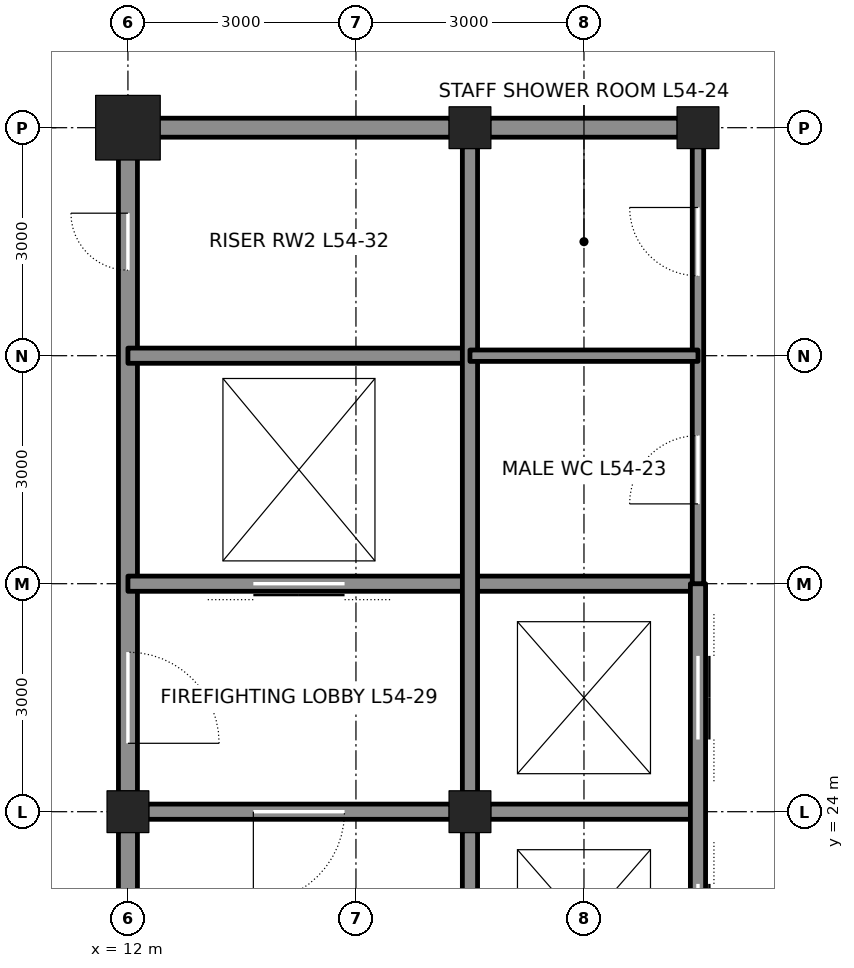
"""IFC4 building model, lengths in metres.
Left out: names, types, materials, properties, quantities, classifications, styles, units other than length and angle.
Written with IfcOpenShell. Run it as: python <this file> out.ifc"""

import sys

from ifc_helpers import new_model, si_unit, direction, frame, frame_2d, origin, origin_2d, place, context, subcontext, project, spatial, rectangle, hollow_rectangle, extrude, element, fill, save


model = new_model("IFC4")
c1 = context("Model", 3, precision=1e-05, world=origin(), true_north=direction((0.0, 1.0)))
c2 = subcontext(c1, "Body", "Model", "MODEL_VIEW")
j1 = project(units=[si_unit("LENGTHUNIT", "METRE"), si_unit("PLANEANGLEUNIT", "RADIAN")], contexts=[c1])
p1 = place(None, origin())
s1 = spatial("IfcSite", under=j1, at=p1, CompositionType="ELEMENT")
p2 = place(p1, origin())
s2 = spatial("IfcBuilding", under=s1, at=p2, CompositionType="ELEMENT")
p3 = place(p2, frame((0.0, 0.0, 243.3)))
s3 = spatial("IfcBuildingStorey", under=s2, at=p3, CompositionType="ELEMENT", Elevation=243.3)
p4 = place(p3, frame((12.0, 33.0, 0.0), z_axis=(0.0, 0.0, 1.0), x_axis=(1.0, 0.0, 0.0)))
e1 = element("IfcColumn", 1, at=p4, inside=s3, PredefinedType="COLUMN", context=c2, shape_type="SweptSolid", body=[
    extrude(hollow_rectangle(XDim=0.85, YDim=0.85, WallThickness=0.085, at=origin_2d()), origin(), (0.0, 0.0, 1.0), 4.2),
])
for number, where, z_axis, x_axis in (
    (2, (16.5, 33.0, 0.0), (0.0, 0.0, 1.0), (1.0, 0.0, 0.0)),
    (3, (19.5, 33.0, 0.0), (0.0, 0.0, 1.0), (1.0, 0.0, 0.0)),
    (4, (12.0, 24.0, 0.0), (0.0, 0.0, 1.0), (1.0, 0.0, 0.0)),
    (5, (16.5, 24.0, 0.0), (0.0, 0.0, 1.0), (1.0, 0.0, 0.0)),
):
    element("IfcColumn", number, at=place(p3, frame(where, z_axis=z_axis, x_axis=x_axis)), inside=s3, PredefinedType="COLUMN", context=c2, shape_type="SweptSolid", body=[
        extrude(hollow_rectangle(XDim=0.55, YDim=0.55, WallThickness=0.045, at=origin_2d()), origin(), (0.0, 0.0, 1.0), 4.2),
    ])
p5 = place(p3, frame((12.0, 21.25, 0.0), z_axis=(0.0, 0.0, 1.0), x_axis=(0.0, 1.0, 0.0)))
e6 = element("IfcWall", 6, at=p5, inside=s3, PredefinedType="SOLIDWALL", context=c2, shape_type="SweptSolid", body=[
    extrude(rectangle(XDim=2.5, YDim=0.25, at=frame_2d((1.25, 0.0))), origin(), (0.0, 0.0, 1.0), 3.113),
])
p6 = place(p3, frame((12.0, 24.25, 0.0), z_axis=(0.0, 0.0, 1.0), x_axis=(0.0, 1.0, 0.0)))
e7 = element("IfcWall", 7, at=p6, inside=s3, PredefinedType="SOLIDWALL", context=c2, shape_type="SweptSolid", body=[
    extrude(rectangle(XDim=8.5, YDim=0.25, at=frame_2d((4.25, 0.0))), origin(), (0.0, 0.0, 1.0), 3.113),
])
p7 = place(p6, frame((0.65, 0.0, 0.0)))
e8 = element("IfcOpeningElement", 8, at=p7, cuts=e7, PredefinedType="OPENING", context=c2, shape_type="SweptSolid", body=[
    extrude(rectangle(XDim=1.2, YDim=2.1, at=frame_2d((0.6, 1.05))), frame((0.0, 0.135, 0.0), z_axis=(0.0, -1.0, 0.0), x_axis=(1.0, 0.0, 0.0)), (0.0, 0.0, 1.0), 0.27),
])
p8 = place(p6, frame((6.875, 0.0, 0.0)))
e9 = element("IfcOpeningElement", 9, at=p8, cuts=e7, PredefinedType="OPENING", context=c2, shape_type="SweptSolid", body=[
    extrude(rectangle(XDim=0.75, YDim=2.1, at=frame_2d((0.375, 1.05))), frame((0.0, 0.135, 0.0), z_axis=(0.0, -1.0, 0.0), x_axis=(1.0, 0.0, 0.0)), (0.0, 0.0, 1.0), 0.27),
])
p9 = place(p3, frame((12.25, 24.0, 0.0), z_axis=(0.0, 0.0, 1.0), x_axis=(1.0, 0.0, 0.0)))
e10 = element("IfcWall", 10, at=p9, inside=s3, PredefinedType="SOLIDWALL", context=c2, shape_type="SweptSolid", body=[
    extrude(rectangle(XDim=4.0, YDim=0.2, at=frame_2d((2.0, 0.0))), origin(), (0.0, 0.0, 1.0), 3.09),
])
p10 = place(p9, frame((1.4, 0.0, 0.0)))
e11 = element("IfcOpeningElement", 11, at=p10, cuts=e10, PredefinedType="OPENING", context=c2, shape_type="SweptSolid", body=[
    extrude(rectangle(XDim=1.2, YDim=2.1, at=frame_2d((0.6, 1.05))), frame((0.0, 0.11, 0.0), z_axis=(0.0, -1.0, 0.0), x_axis=(1.0, 0.0, 0.0)), (0.0, 0.0, 1.0), 0.22),
])
p11 = place(p3, frame((16.75, 24.0, 0.0), z_axis=(0.0, 0.0, 1.0), x_axis=(1.0, 0.0, 0.0)))
e12 = element("IfcWall", 12, at=p11, inside=s3, PredefinedType="SOLIDWALL", context=c2, shape_type="SweptSolid", body=[
    extrude(rectangle(XDim=2.75, YDim=0.2, at=frame_2d((1.375, 0.0))), origin(), (0.0, 0.0, 1.0), 3.09),
])
p12 = place(p3, frame((12.0, 27.0, 0.0), z_axis=(0.0, 0.0, 1.0), x_axis=(1.0, 0.0, 0.0)))
e13 = element("IfcWall", 13, at=p12, inside=s3, PredefinedType="SOLIDWALL", context=c2, shape_type="SweptSolid", body=[
    extrude(rectangle(XDim=7.5, YDim=0.2, at=frame_2d((3.75, 0.0))), origin(), (0.0, 0.0, 1.0), 4.04),
])
p13 = place(p12, frame((1.65, 0.0, 0.0)))
e14 = element("IfcOpeningElement", 14, at=p13, cuts=e13, PredefinedType="OPENING", context=c2, shape_type="SweptSolid", body=[
    extrude(rectangle(XDim=1.2, YDim=2.1, at=frame_2d((0.6, 1.05))), frame((0.0, 0.11, 0.0), z_axis=(0.0, -1.0, 0.0), x_axis=(1.0, 0.0, 0.0)), (0.0, 0.0, 1.0), 0.22),
])
p14 = place(p3, frame((12.0, 30.0, 0.0), z_axis=(0.0, 0.0, 1.0), x_axis=(1.0, 0.0, 0.0)))
e15 = element("IfcWall", 15, at=p14, inside=s3, PredefinedType="SOLIDWALL", context=c2, shape_type="SweptSolid", body=[
    extrude(rectangle(XDim=4.5, YDim=0.2, at=frame_2d((2.25, 0.0))), origin(), (0.0, 0.0, 1.0), 4.04),
])
p15 = place(p3, frame((12.25, 33.0, 0.0), z_axis=(0.0, 0.0, 1.0), x_axis=(1.0, 0.0, 0.0)))
e16 = element("IfcWall", 16, at=p15, inside=s3, PredefinedType="SOLIDWALL", context=c2, shape_type="SweptSolid", body=[
    extrude(rectangle(XDim=4.0, YDim=0.25, at=frame_2d((2.0, 0.0))), origin(), (0.0, 0.0, 1.0), 3.181),
])
p16 = place(p3, frame((16.75, 33.0, 0.0), z_axis=(0.0, 0.0, 1.0), x_axis=(1.0, 0.0, 0.0)))
e17 = element("IfcWall", 17, at=p16, inside=s3, PredefinedType="SOLIDWALL", context=c2, shape_type="SweptSolid", body=[
    extrude(rectangle(XDim=2.5, YDim=0.25, at=frame_2d((1.25, 0.0))), origin(), (0.0, 0.0, 1.0), 3.181),
])
p17 = place(p3, frame((16.5, 21.25, 0.0), z_axis=(0.0, 0.0, 1.0), x_axis=(0.0, 1.0, 0.0)))
e18 = element("IfcWall", 18, at=p17, inside=s3, PredefinedType="SOLIDWALL", context=c2, shape_type="SweptSolid", body=[
    extrude(rectangle(XDim=2.5, YDim=0.2, at=frame_2d((1.25, 0.0))), origin(), (0.0, 0.0, 1.0), 3.113),
])
p18 = place(p3, frame((16.5, 24.25, 0.0), z_axis=(0.0, 0.0, 1.0), x_axis=(0.0, 1.0, 0.0)))
e19 = element("IfcWall", 19, at=p18, inside=s3, PredefinedType="SOLIDWALL", context=c2, shape_type="SweptSolid", body=[
    extrude(rectangle(XDim=8.5, YDim=0.2, at=frame_2d((4.25, 0.0))), origin(), (0.0, 0.0, 1.0), 3.113),
])
p19 = place(p3, frame((19.5, 15.0, 0.0), z_axis=(0.0, 0.0, 1.0), x_axis=(0.0, 1.0, 0.0)))
e20 = element("IfcWall", 20, at=p19, inside=s3, PredefinedType="SOLIDWALL", context=c2, shape_type="SweptSolid", body=[
    extrude(rectangle(XDim=12.0, YDim=0.2, at=frame_2d((6.0, 0.0))), origin(), (0.0, 0.0, 1.0), 3.064),
])
p20 = place(p19, frame((0.95, 0.0, 0.0)))
e21 = element("IfcOpeningElement", 21, at=p20, cuts=e20, PredefinedType="OPENING", context=c2, shape_type="SweptSolid", body=[
    extrude(rectangle(XDim=1.1, YDim=2.1, at=frame_2d((0.55, 1.05))), frame((0.0, 0.11, 0.0), z_axis=(0.0, -1.0, 0.0), x_axis=(1.0, 0.0, 0.0)), (0.0, 0.0, 1.0), 0.22),
])
p21 = place(p19, frame((3.95, 0.0, 0.0)))
e22 = element("IfcOpeningElement", 22, at=p21, cuts=e20, PredefinedType="OPENING", context=c2, shape_type="SweptSolid", body=[
    extrude(rectangle(XDim=1.1, YDim=2.1, at=frame_2d((0.55, 1.05))), frame((0.0, 0.11, 0.0), z_axis=(0.0, -1.0, 0.0), x_axis=(1.0, 0.0, 0.0)), (0.0, 0.0, 1.0), 0.22),
])
p22 = place(p19, frame((6.95, 0.0, 0.0)))
e23 = element("IfcOpeningElement", 23, at=p22, cuts=e20, PredefinedType="OPENING", context=c2, shape_type="SweptSolid", body=[
    extrude(rectangle(XDim=1.1, YDim=2.1, at=frame_2d((0.55, 1.05))), frame((0.0, 0.11, 0.0), z_axis=(0.0, -1.0, 0.0), x_axis=(1.0, 0.0, 0.0)), (0.0, 0.0, 1.0), 0.22),
])
p23 = place(p19, frame((9.95, 0.0, 0.0)))
e24 = element("IfcOpeningElement", 24, at=p23, cuts=e20, PredefinedType="OPENING", context=c2, shape_type="SweptSolid", body=[
    extrude(rectangle(XDim=1.1, YDim=2.1, at=frame_2d((0.55, 1.05))), frame((0.0, 0.11, 0.0), z_axis=(0.0, -1.0, 0.0), x_axis=(1.0, 0.0, 0.0)), (0.0, 0.0, 1.0), 0.22),
])
p24 = place(p3, frame((19.5, 27.0, 0.0), z_axis=(0.0, 0.0, 1.0), x_axis=(0.0, 1.0, 0.0)))
e25 = element("IfcWall", 25, at=p24, inside=s3, PredefinedType="PARTITIONING", context=c2, shape_type="SweptSolid", body=[
    extrude(rectangle(XDim=5.75, YDim=0.15, at=frame_2d((2.875, 0.0))), origin(), (0.0, 0.0, 1.0), 3.064),
])
p25 = place(p24, frame((1.05, 0.0, 0.0)))
e26 = element("IfcOpeningElement", 26, at=p25, cuts=e25, PredefinedType="OPENING", context=c2, shape_type="SweptSolid", body=[
    extrude(rectangle(XDim=0.9, YDim=2.1, at=frame_2d((0.45, 1.05))), frame((0.0, 0.085, 0.0), z_axis=(0.0, -1.0, 0.0), x_axis=(1.0, 0.0, 0.0)), (0.0, 0.0, 1.0), 0.17),
])
p26 = place(p24, frame((4.05, 0.0, 0.0)))
e27 = element("IfcOpeningElement", 27, at=p26, cuts=e25, PredefinedType="OPENING", context=c2, shape_type="SweptSolid", body=[
    extrude(rectangle(XDim=0.9, YDim=2.1, at=frame_2d((0.45, 1.05))), frame((0.0, 0.085, 0.0), z_axis=(0.0, -1.0, 0.0), x_axis=(1.0, 0.0, 0.0)), (0.0, 0.0, 1.0), 0.17),
])
p27 = place(p3, frame((16.5, 30.0, 0.0), z_axis=(0.0, 0.0, 1.0), x_axis=(1.0, 0.0, 0.0)))
e28 = element("IfcWall", 28, at=p27, inside=s3, PredefinedType="PARTITIONING", context=c2, shape_type="SweptSolid", body=[
    extrude(rectangle(XDim=3.0, YDim=0.15, at=frame_2d((1.5, 0.0))), origin(), (0.0, 0.0, 1.0), 4.04),
])
p28 = place(p10, frame((1.2, 0.0, 0.0), z_axis=(0.0, 0.0, 1.0), x_axis=(-1.0, 0.0, 0.0)))
e29 = element("IfcDoor", 29, at=p28, inside=s3, OperationType="SINGLE_SWING_RIGHT", PredefinedType="DOOR", context=c2, shape_type="SweptSolid", body=[
    extrude(rectangle(XDim=1.2, YDim=2.1, at=frame_2d((0.6, 1.05))), frame((0.0, 0.025, 0.0), z_axis=(0.0, -1.0, 0.0), x_axis=(1.0, 0.0, 0.0)), (0.0, 0.0, 1.0), 0.05),
])
fill(e11, e29)
p29 = place(p7, frame((1.2, 0.0, 0.0), z_axis=(0.0, 0.0, 1.0), x_axis=(-1.0, 0.0, 0.0)))
e30 = element("IfcDoor", 30, at=p29, inside=s3, OperationType="SINGLE_SWING_RIGHT", PredefinedType="DOOR", context=c2, shape_type="SweptSolid", body=[
    extrude(rectangle(XDim=1.2, YDim=2.1, at=frame_2d((0.6, 1.05))), frame((0.0, 0.025, 0.0), z_axis=(0.0, -1.0, 0.0), x_axis=(1.0, 0.0, 0.0)), (0.0, 0.0, 1.0), 0.05),
])
fill(e8, e30)
p30 = place(p13, origin())
e31 = element("IfcDoor", 31, at=p30, inside=s3, OperationType="DOUBLE_DOOR_SLIDING", PredefinedType="DOOR", context=c2, shape_type="SweptSolid", body=[
    extrude(rectangle(XDim=1.2, YDim=2.1, at=frame_2d((0.6, 1.05))), frame((0.0, 0.025, 0.0), z_axis=(0.0, -1.0, 0.0), x_axis=(1.0, 0.0, 0.0)), (0.0, 0.0, 1.0), 0.05),
])
fill(e14, e31)
p31 = place(p8, origin())
e32 = element("IfcDoor", 32, at=p31, inside=s3, OperationType="SINGLE_SWING_RIGHT", PredefinedType="DOOR", context=c2, shape_type="SweptSolid", body=[
    extrude(rectangle(XDim=0.75, YDim=2.1, at=frame_2d((0.375, 1.05))), frame((0.0, 0.025, 0.0), z_axis=(0.0, -1.0, 0.0), x_axis=(1.0, 0.0, 0.0)), (0.0, 0.0, 1.0), 0.05),
])
fill(e9, e32)
p32 = place(p25, origin())
e33 = element("IfcDoor", 33, at=p32, inside=s3, OperationType="SINGLE_SWING_LEFT", PredefinedType="DOOR", context=c2, shape_type="SweptSolid", body=[
    extrude(rectangle(XDim=0.9, YDim=2.1, at=frame_2d((0.45, 1.05))), frame((0.0, 0.025, 0.0), z_axis=(0.0, -1.0, 0.0), x_axis=(1.0, 0.0, 0.0)), (0.0, 0.0, 1.0), 0.05),
])
fill(e26, e33)
p33 = place(p26, origin())
e34 = element("IfcDoor", 34, at=p33, inside=s3, OperationType="SINGLE_SWING_RIGHT", PredefinedType="DOOR", context=c2, shape_type="SweptSolid", body=[
    extrude(rectangle(XDim=0.9, YDim=2.1, at=frame_2d((0.45, 1.05))), frame((0.0, 0.025, 0.0), z_axis=(0.0, -1.0, 0.0), x_axis=(1.0, 0.0, 0.0)), (0.0, 0.0, 1.0), 0.05),
])
fill(e27, e34)
p34 = place(p22, origin())
e35 = element("IfcDoor", 35, at=p34, inside=s3, OperationType="DOUBLE_DOOR_SLIDING", PredefinedType="DOOR", context=c2, shape_type="SweptSolid", body=[
    extrude(rectangle(XDim=1.1, YDim=2.1, at=frame_2d((0.55, 1.05))), frame((0.0, 0.025, 0.0), z_axis=(0.0, -1.0, 0.0), x_axis=(1.0, 0.0, 0.0)), (0.0, 0.0, 1.0), 0.05),
])
fill(e23, e35)
p35 = place(p23, origin())
e36 = element("IfcDoor", 36, at=p35, inside=s3, OperationType="DOUBLE_DOOR_SLIDING", PredefinedType="DOOR", context=c2, shape_type="SweptSolid", body=[
    extrude(rectangle(XDim=1.1, YDim=2.1, at=frame_2d((0.55, 1.05))), frame((0.0, 0.025, 0.0), z_axis=(0.0, -1.0, 0.0), x_axis=(1.0, 0.0, 0.0)), (0.0, 0.0, 1.0), 0.05),
])
fill(e24, e36)
save(model, sys.argv[1])
